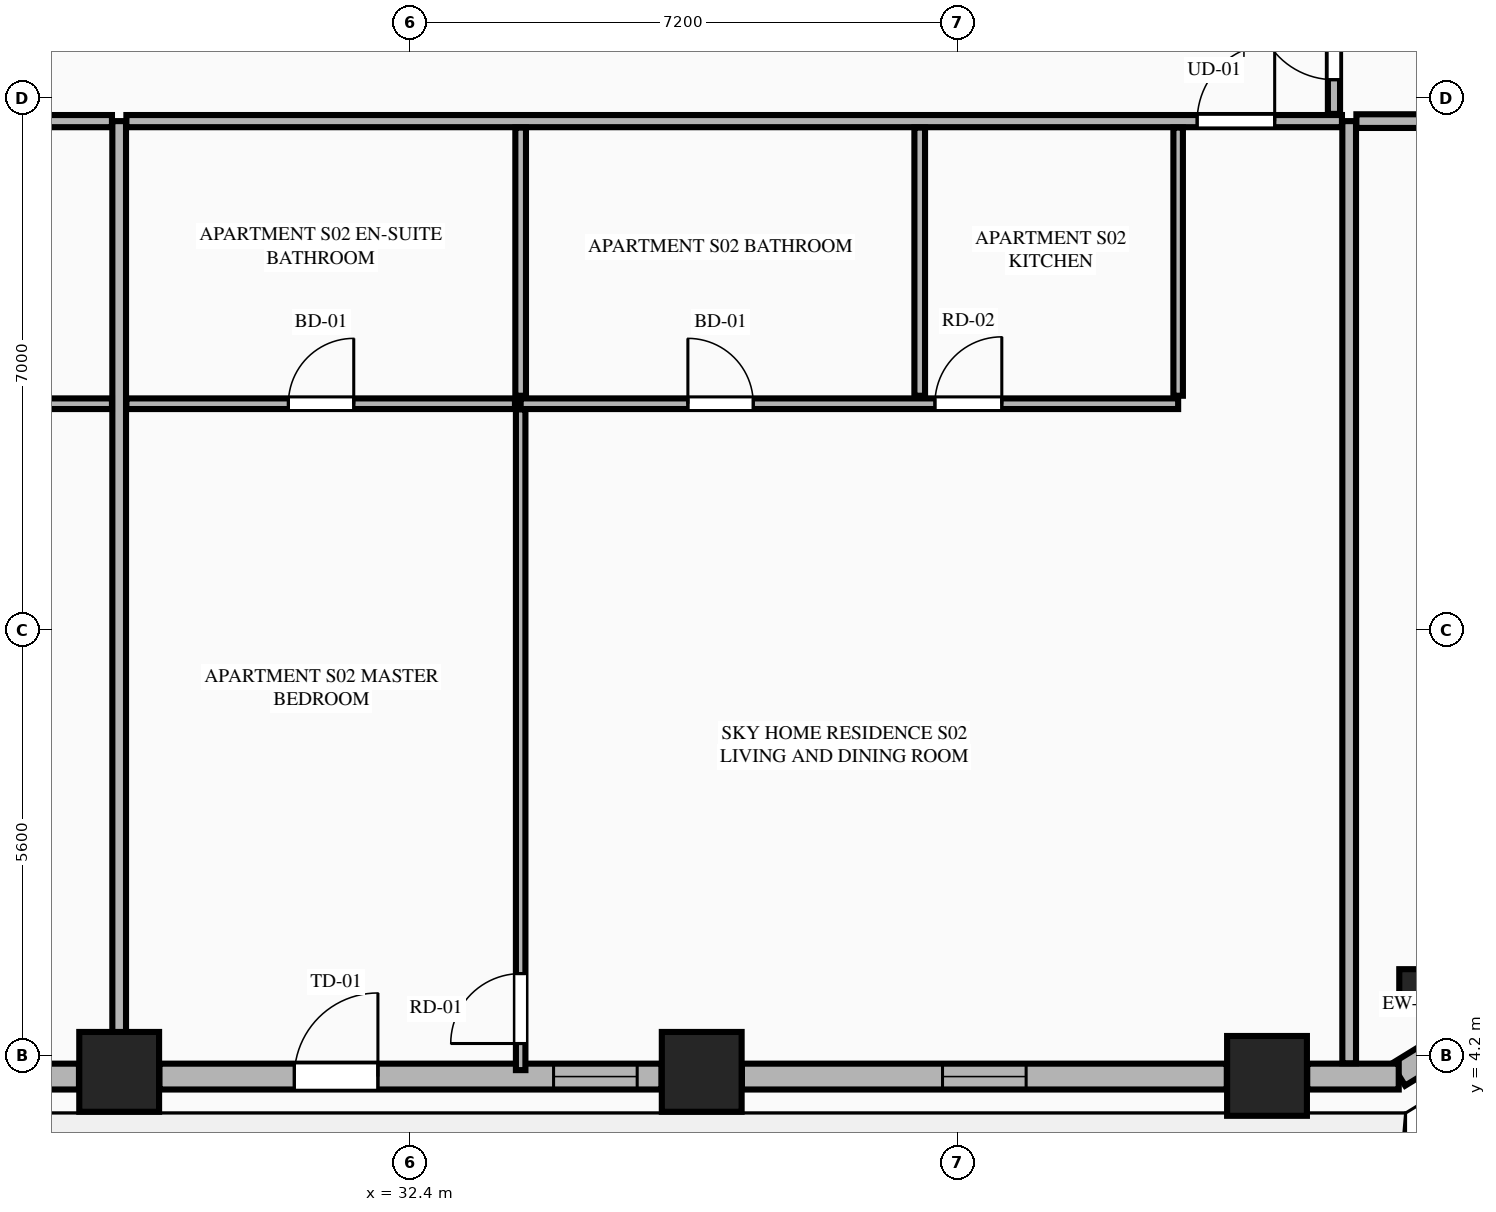
"""IFC4 building model, lengths in metres.
Left out: names, types, materials, properties, quantities, classifications, styles, units other than length and angle.
Written with IfcOpenShell. Run it as: python <this file> out.ifc"""

import sys

from ifc_helpers import new_model, si_unit, direction, frame, frame_2d, origin, origin_2d, place, context, subcontext, project, spatial, rectangle, extrude, element, fill, save


model = new_model("IFC4")
c1 = context("Model", 3, precision=1e-05, world=origin(), true_north=direction((0.0, 1.0)))
c2 = subcontext(c1, "Body", "Model", "MODEL_VIEW")
j1 = project(units=[si_unit("LENGTHUNIT", "METRE"), si_unit("PLANEANGLEUNIT", "RADIAN")], contexts=[c1])
p1 = place(None, origin())
s1 = spatial("IfcSite", under=j1, at=p1, CompositionType="ELEMENT")
p2 = place(p1, origin())
s2 = spatial("IfcBuilding", under=s1, at=p2, CompositionType="ELEMENT")
p3 = place(p2, frame((0.0, 0.0, 133.9)))
s3 = spatial("IfcBuildingStorey", under=s2, at=p3, CompositionType="ELEMENT", Elevation=133.9)
for number, where, z_axis, x_axis in (
    (1, (28.568, 3.992, 0.0), (0.0, 0.0, 1.0), (1.0, 0.0, 0.0)),
    (2, (36.232, 3.992, 0.0), (0.0, 0.0, 1.0), (1.0, 0.0, 0.0)),
    (3, (43.669, 3.939, 0.0), (0.0, 0.0, 1.0), (1.0, 0.0, 0.0)),
):
    element("IfcColumn", number, at=place(p3, frame(where, z_axis=z_axis, x_axis=x_axis)), inside=s3, PredefinedType="COLUMN", context=c2, shape_type="SweptSolid", body=[
        extrude(rectangle(XDim=1.05, YDim=1.05, at=origin_2d()), origin(), (0.0, 0.0, 1.0), 3.55),
    ])
p4 = place(p3, frame((45.659, 5.093, 0.0), z_axis=(0.0, 0.0, 1.0), x_axis=(0.865160173452, 0.501495637342, 0.0)))
e4 = element("IfcColumn", 4, at=p4, inside=s3, PredefinedType="PILASTER", context=c2, shape_type="SweptSolid", body=[
    extrude(rectangle(XDim=0.5, YDim=0.35, at=origin_2d()), origin(), (0.0, 0.0, 1.0), 3.55),
])
p5 = place(p3, frame((45.397, 3.955, 0.0), z_axis=(0.0, 0.0, 1.0), x_axis=(0.851798915137, 0.523868884523, 0.0)))
e5 = element("IfcWall", 5, at=p5, inside=s3, PredefinedType="STANDARD", context=c2, shape_type="SweptSolid", body=[
    extrude(rectangle(XDim=1.848, YDim=0.34, at=frame_2d((0.924, 0.0))), origin(), (0.0, 0.0, 1.0), 3.34),
])
p6 = place(p3, frame((21.66, 3.93, 0.0), z_axis=(0.0, 0.0, 1.0), x_axis=(1.0, 0.0, 0.0)))
e6 = element("IfcWall", 6, at=p6, inside=s3, PredefinedType="STANDARD", context=c2, shape_type="SweptSolid", body=[
    extrude(rectangle(XDim=6.379, YDim=0.34, at=frame_2d((3.189, 0.0))), origin(), (0.0, 0.0, 1.0), 2.797),
])
p7 = place(p6, frame((2.64, 0.0, 0.75)))
e7 = element("IfcOpeningElement", 7, at=p7, cuts=e6, PredefinedType="OPENING", context=c2, shape_type="SweptSolid", body=[
    extrude(rectangle(XDim=1.1, YDim=1.897, at=frame_2d((0.55, 0.948))), frame((0.0, 0.18, 0.0), z_axis=(0.0, -1.0, 0.0), x_axis=(1.0, 0.0, 0.0)), (0.0, 0.0, 1.0), 0.36),
])
p8 = place(p3, frame((29.097, 3.93, 0.0), z_axis=(0.0, 0.0, 1.0), x_axis=(1.0, 0.0, 0.0)))
e8 = element("IfcWall", 8, at=p8, inside=s3, PredefinedType="STANDARD", context=c2, shape_type="SweptSolid", body=[
    extrude(rectangle(XDim=6.606, YDim=0.34, at=frame_2d((3.303, 0.0))), origin(), (0.0, 0.0, 1.0), 2.797),
])
p9 = place(p8, frame((1.775, 0.0, 0.0)))
e9 = element("IfcOpeningElement", 9, at=p9, cuts=e8, PredefinedType="OPENING", context=c2, shape_type="SweptSolid", body=[
    extrude(rectangle(XDim=1.1, YDim=2.25, at=frame_2d((0.55, 1.125))), frame((0.0, 0.18, 0.0), z_axis=(0.0, -1.0, 0.0), x_axis=(1.0, 0.0, 0.0)), (0.0, 0.0, 1.0), 0.36),
])
p10 = place(p8, frame((5.186, 0.0, 0.75)))
e10 = element("IfcOpeningElement", 10, at=p10, cuts=e8, PredefinedType="OPENING", context=c2, shape_type="SweptSolid", body=[
    extrude(rectangle(XDim=1.1, YDim=1.897, at=frame_2d((0.55, 0.948))), frame((0.0, 0.18, 0.0), z_axis=(0.0, -1.0, 0.0), x_axis=(1.0, 0.0, 0.0)), (0.0, 0.0, 1.0), 0.36),
])
p11 = place(p3, frame((36.761, 3.93, 0.0), z_axis=(0.0, 0.0, 1.0), x_axis=(1.0, 0.0, 0.0)))
e11 = element("IfcWall", 11, at=p11, inside=s3, PredefinedType="STANDARD", context=c2, shape_type="SweptSolid", body=[
    extrude(rectangle(XDim=6.379, YDim=0.34, at=frame_2d((3.189, 0.0))), origin(), (0.0, 0.0, 1.0), 2.797),
])
p12 = place(p11, frame((2.639, 0.0, 0.75)))
e12 = element("IfcOpeningElement", 12, at=p12, cuts=e11, PredefinedType="OPENING", context=c2, shape_type="SweptSolid", body=[
    extrude(rectangle(XDim=1.1, YDim=1.897, at=frame_2d((0.55, 0.948))), frame((0.0, 0.18, 0.0), z_axis=(0.0, -1.0, 0.0), x_axis=(1.0, 0.0, 0.0)), (0.0, 0.0, 1.0), 0.36),
])
p13 = place(p3, frame((44.198, 3.93, 0.0), z_axis=(0.0, 0.0, 1.0), x_axis=(1.0, 0.0, 0.0)))
e13 = element("IfcWall", 13, at=p13, inside=s3, PredefinedType="STANDARD", context=c2, shape_type="SweptSolid", body=[
    extrude(rectangle(XDim=1.204, YDim=0.34, at=frame_2d((0.602, 0.0))), origin(), (0.0, 0.0, 1.0), 3.34),
])
p14 = place(p3, frame((28.568, 4.105, 0.0), z_axis=(0.0, 0.0, 1.0), x_axis=(0.0, 1.0, 0.0)))
e14 = element("IfcWall", 14, at=p14, inside=s3, PredefinedType="PARTITIONING", context=c2, shape_type="SweptSolid", body=[
    extrude(rectangle(XDim=12.395, YDim=0.18, at=frame_2d((6.198, 0.0))), origin(), (0.0, 0.0, 1.0), 2.722),
])
p15 = place(p3, frame((44.75, 4.105, 0.0), z_axis=(0.0, 0.0, 1.0), x_axis=(0.0, 1.0, 0.0)))
e15 = element("IfcWall", 15, at=p15, inside=s3, PredefinedType="PARTITIONING", context=c2, shape_type="SweptSolid", body=[
    extrude(rectangle(XDim=12.395, YDim=0.18, at=frame_2d((6.198, 0.0))), origin(), (0.0, 0.0, 1.0), 3.34),
])
p16 = place(p3, frame((20.145, 16.5, 0.0), z_axis=(0.0, 0.0, 1.0), x_axis=(1.0, 0.0, 0.0)))
e16 = element("IfcWall", 16, at=p16, inside=s3, PredefinedType="PARTITIONING", context=c2, shape_type="SweptSolid", body=[
    extrude(rectangle(XDim=8.328, YDim=0.16, at=frame_2d((4.164, 0.0))), origin(), (0.0, 0.0, 1.0), 3.34),
])
p17 = place(p16, frame((0.405, 0.0, 0.0)))
e17 = element("IfcOpeningElement", 17, at=p17, cuts=e16, PredefinedType="OPENING", context=c2, shape_type="SweptSolid", body=[
    extrude(rectangle(XDim=1.02, YDim=2.25, at=frame_2d((0.51, 1.125))), frame((0.0, 0.09, 0.0), z_axis=(0.0, -1.0, 0.0), x_axis=(1.0, 0.0, 0.0)), (0.0, 0.0, 1.0), 0.18),
])
p18 = place(p3, frame((22.1, 12.782, 0.0), z_axis=(0.0, 0.0, 1.0), x_axis=(1.0, 0.0, 0.0)))
e18 = element("IfcWall", 18, at=p18, inside=s3, PredefinedType="PLUMBINGWALL", context=c2, shape_type="SweptSolid", body=[
    extrude(rectangle(XDim=6.373, YDim=0.14, at=frame_2d((3.187, 0.0))), origin(), (0.0, 0.0, 1.0), 3.34),
])
p19 = place(p18, frame((4.314, 0.0, 0.0)))
e19 = element("IfcOpeningElement", 19, at=p19, cuts=e18, PredefinedType="OPENING", context=c2, shape_type="SweptSolid", body=[
    extrude(rectangle(XDim=0.86, YDim=2.1, at=frame_2d((0.43, 1.05))), frame((0.0, 0.08, 0.0), z_axis=(0.0, -1.0, 0.0), x_axis=(1.0, 0.0, 0.0)), (0.0, 0.0, 1.0), 0.16),
])
p20 = place(p18, frame((0.22, 0.0, 0.0)))
e20 = element("IfcOpeningElement", 20, at=p20, cuts=e18, PredefinedType="OPENING", context=c2, shape_type="SweptSolid", body=[
    extrude(rectangle(XDim=0.88, YDim=2.15, at=frame_2d((0.44, 1.075))), frame((0.0, 0.08, 0.0), z_axis=(0.0, -1.0, 0.0), x_axis=(1.0, 0.0, 0.0)), (0.0, 0.0, 1.0), 0.16),
])
p21 = place(p3, frame((28.663, 16.5, 0.0), z_axis=(0.0, 0.0, 1.0), x_axis=(1.0, 0.0, 0.0)))
e21 = element("IfcWall", 21, at=p21, inside=s3, PredefinedType="PARTITIONING", context=c2, shape_type="SweptSolid", body=[
    extrude(rectangle(XDim=15.992, YDim=0.16, at=frame_2d((7.996, 0.0))), origin(), (0.0, 0.0, 1.0), 3.34),
])
p22 = place(p21, frame((14.087, 0.0, 0.0)))
e22 = element("IfcOpeningElement", 22, at=p22, cuts=e21, PredefinedType="OPENING", context=c2, shape_type="SweptSolid", body=[
    extrude(rectangle(XDim=1.02, YDim=2.25, at=frame_2d((0.51, 1.125))), frame((0.0, 0.09, 0.0), z_axis=(0.0, -1.0, 0.0), x_axis=(1.0, 0.0, 0.0)), (0.0, 0.0, 1.0), 0.18),
])
p23 = place(p3, frame((42.5, 12.887, 0.0), z_axis=(0.0, 0.0, 1.0), x_axis=(0.0, 1.0, 0.0)))
e23 = element("IfcWall", 23, at=p23, inside=s3, PredefinedType="PARTITIONING", context=c2, shape_type="SweptSolid", body=[
    extrude(rectangle(XDim=3.528, YDim=0.125, at=frame_2d((1.764, 0.0))), origin(), (0.0, 0.0, 1.0), 2.722),
])
p24 = place(p3, frame((33.85, 12.782, 0.0), z_axis=(0.0, 0.0, 1.0), x_axis=(1.0, 0.0, 0.0)))
e24 = element("IfcWall", 24, at=p24, inside=s3, PredefinedType="PLUMBINGWALL", context=c2, shape_type="SweptSolid", body=[
    extrude(rectangle(XDim=8.65, YDim=0.14, at=frame_2d((4.325, 0.0))), origin(), (0.0, 0.0, 1.0), 3.34),
])
p25 = place(p24, frame((2.2, 0.0, 0.0)))
e25 = element("IfcOpeningElement", 25, at=p25, cuts=e24, PredefinedType="OPENING", context=c2, shape_type="SweptSolid", body=[
    extrude(rectangle(XDim=0.86, YDim=2.1, at=frame_2d((0.43, 1.05))), frame((0.0, 0.08, 0.0), z_axis=(0.0, -1.0, 0.0), x_axis=(1.0, 0.0, 0.0)), (0.0, 0.0, 1.0), 0.16),
])
p26 = place(p24, frame((5.45, 0.0, 0.0)))
e26 = element("IfcOpeningElement", 26, at=p26, cuts=e24, PredefinedType="OPENING", context=c2, shape_type="SweptSolid", body=[
    extrude(rectangle(XDim=0.88, YDim=2.15, at=frame_2d((0.44, 1.075))), frame((0.0, 0.08, 0.0), z_axis=(0.0, -1.0, 0.0), x_axis=(1.0, 0.0, 0.0)), (0.0, 0.0, 1.0), 0.16),
])
p27 = place(p3, frame((28.663, 12.782, 0.0), z_axis=(0.0, 0.0, 1.0), x_axis=(1.0, 0.0, 0.0)))
e27 = element("IfcWall", 27, at=p27, inside=s3, PredefinedType="PLUMBINGWALL", context=c2, shape_type="SweptSolid", body=[
    extrude(rectangle(XDim=5.112, YDim=0.14, at=frame_2d((2.556, 0.0))), origin(), (0.0, 0.0, 1.0), 3.34),
])
p28 = place(p27, frame((2.131, 0.0, 0.0)))
e28 = element("IfcOpeningElement", 28, at=p28, cuts=e27, PredefinedType="OPENING", context=c2, shape_type="SweptSolid", body=[
    extrude(rectangle(XDim=0.86, YDim=2.1, at=frame_2d((0.43, 1.05))), frame((0.0, 0.08, 0.0), z_axis=(0.0, -1.0, 0.0), x_axis=(1.0, 0.0, 0.0)), (0.0, 0.0, 1.0), 0.16),
])
for number, where, z_axis, x_axis in (
    (29, (39.1, 12.887, 0.0), (0.0, 0.0, 1.0), (0.0, 1.0, 0.0)),
    (30, (33.85, 12.887, 0.0), (0.0, 0.0, 1.0), (0.0, 1.0, 0.0)),
):
    element("IfcWall", number, at=place(p3, frame(where, z_axis=z_axis, x_axis=x_axis)), inside=s3, PredefinedType="PLUMBINGWALL", context=c2, shape_type="SweptSolid", body=[
        extrude(rectangle(XDim=3.528, YDim=0.14, at=frame_2d((1.764, 0.0))), origin(), (0.0, 0.0, 1.0), 3.34),
    ])
p29 = place(p3, frame((33.85, 4.015, 0.0), z_axis=(0.0, 0.0, 1.0), x_axis=(0.0, 1.0, 0.0)))
e31 = element("IfcWall", 31, at=p29, inside=s3, PredefinedType="PARTITIONING", context=c2, shape_type="SweptSolid", body=[
    extrude(rectangle(XDim=8.692, YDim=0.125, at=frame_2d((4.346, 0.0))), origin(), (0.0, 0.0, 1.0), 3.34),
])
p30 = place(p29, frame((0.35, 0.0, 0.0)))
e32 = element("IfcOpeningElement", 32, at=p30, cuts=e31, PredefinedType="OPENING", context=c2, shape_type="SweptSolid", body=[
    extrude(rectangle(XDim=0.92, YDim=2.15, at=frame_2d((0.46, 1.075))), frame((0.0, 0.073, 0.0), z_axis=(0.0, -1.0, 0.0), x_axis=(1.0, 0.0, 0.0)), (0.0, 0.0, 1.0), 0.145),
])
p31 = place(p3, frame((44.845, 16.5, 0.0), z_axis=(0.0, 0.0, 1.0), x_axis=(1.0, 0.0, 0.0)))
e33 = element("IfcWall", 33, at=p31, inside=s3, PredefinedType="PARTITIONING", context=c2, shape_type="SweptSolid", body=[
    extrude(rectangle(XDim=7.77, YDim=0.18, at=frame_2d((3.885, 0.0))), origin(), (0.0, 0.0, 1.0), 3.34),
])
p32 = place(p3, frame((44.55, 16.595, 0.0), z_axis=(0.0, 0.0, 1.0), x_axis=(0.0, 1.0, 0.0)))
e34 = element("IfcWall", 34, at=p32, inside=s3, PredefinedType="PARTITIONING", context=c2, shape_type="SweptSolid", body=[
    extrude(rectangle(XDim=9.21, YDim=0.16, at=frame_2d((4.605, 0.0))), origin(), (0.0, 0.0, 1.0), 3.34),
])
p33 = place(p32, frame((0.45, 0.0, 0.0)))
e35 = element("IfcOpeningElement", 35, at=p33, cuts=e34, PredefinedType="OPENING", context=c2, shape_type="SweptSolid", body=[
    extrude(rectangle(XDim=1.02, YDim=2.25, at=frame_2d((0.51, 1.125))), frame((0.0, 0.09, 0.0), z_axis=(0.0, -1.0, 0.0), x_axis=(1.0, 0.0, 0.0)), (0.0, 0.0, 1.0), 0.18),
])
p34 = place(p9, origin())
e36 = element("IfcDoor", 36, at=p34, inside=s3, OperationType="SINGLE_SWING_RIGHT", PredefinedType="DOOR", context=c2, shape_type="SweptSolid", body=[
    extrude(rectangle(XDim=1.1, YDim=2.25, at=frame_2d((0.55, 1.125))), frame((0.0, 0.025, 0.0), z_axis=(0.0, -1.0, 0.0), x_axis=(1.0, 0.0, 0.0)), (0.0, 0.0, 1.0), 0.05),
])
fill(e9, e36)
p35 = place(p12, origin())
e37 = element("IfcWindow", 37, at=p35, inside=s3, PartitioningType="SINGLE_PANEL", PredefinedType="WINDOW", context=c2, shape_type="SweptSolid", body=[
    extrude(rectangle(XDim=1.1, YDim=1.897, at=frame_2d((0.55, 0.948))), frame((0.0, 0.03, 0.0), z_axis=(0.0, -1.0, 0.0), x_axis=(1.0, 0.0, 0.0)), (0.0, 0.0, 1.0), 0.06),
])
fill(e12, e37)
p36 = place(p25, origin())
e38 = element("IfcDoor", 38, at=p36, inside=s3, OperationType="SINGLE_SWING_LEFT", PredefinedType="DOOR", context=c2, shape_type="SweptSolid", body=[
    extrude(rectangle(XDim=0.86, YDim=2.1, at=frame_2d((0.43, 1.05))), frame((0.0, 0.025, 0.0), z_axis=(0.0, -1.0, 0.0), x_axis=(1.0, 0.0, 0.0)), (0.0, 0.0, 1.0), 0.05),
])
fill(e25, e38)
p37 = place(p28, origin())
e39 = element("IfcDoor", 39, at=p37, inside=s3, OperationType="SINGLE_SWING_RIGHT", PredefinedType="DOOR", context=c2, shape_type="SweptSolid", body=[
    extrude(rectangle(XDim=0.86, YDim=2.1, at=frame_2d((0.43, 1.05))), frame((0.0, 0.025, 0.0), z_axis=(0.0, -1.0, 0.0), x_axis=(1.0, 0.0, 0.0)), (0.0, 0.0, 1.0), 0.05),
])
fill(e28, e39)
p38 = place(p22, origin())
e40 = element("IfcDoor", 40, at=p38, inside=s3, OperationType="SINGLE_SWING_RIGHT", PredefinedType="DOOR", context=c2, shape_type="SweptSolid", body=[
    extrude(rectangle(XDim=1.02, YDim=2.25, at=frame_2d((0.51, 1.125))), frame((0.0, 0.025, 0.0), z_axis=(0.0, -1.0, 0.0), x_axis=(1.0, 0.0, 0.0)), (0.0, 0.0, 1.0), 0.05),
])
fill(e22, e40)
p39 = place(p26, origin())
e41 = element("IfcDoor", 41, at=p39, inside=s3, OperationType="SINGLE_SWING_RIGHT", PredefinedType="DOOR", context=c2, shape_type="SweptSolid", body=[
    extrude(rectangle(XDim=0.88, YDim=2.15, at=frame_2d((0.44, 1.075))), frame((0.0, 0.025, 0.0), z_axis=(0.0, -1.0, 0.0), x_axis=(1.0, 0.0, 0.0)), (0.0, 0.0, 1.0), 0.05),
])
fill(e26, e41)
p40 = place(p30, origin())
e42 = element("IfcDoor", 42, at=p40, inside=s3, OperationType="SINGLE_SWING_LEFT", PredefinedType="DOOR", context=c2, shape_type="SweptSolid", body=[
    extrude(rectangle(XDim=0.92, YDim=2.15, at=frame_2d((0.46, 1.075))), frame((0.0, 0.025, 0.0), z_axis=(0.0, -1.0, 0.0), x_axis=(1.0, 0.0, 0.0)), (0.0, 0.0, 1.0), 0.05),
])
fill(e32, e42)
p41 = place(p33, origin())
e43 = element("IfcDoor", 43, at=p41, inside=s3, OperationType="SINGLE_SWING_RIGHT", PredefinedType="DOOR", context=c2, shape_type="SweptSolid", body=[
    extrude(rectangle(XDim=1.02, YDim=2.25, at=frame_2d((0.51, 1.125))), frame((0.0, 0.025, 0.0), z_axis=(0.0, -1.0, 0.0), x_axis=(1.0, 0.0, 0.0)), (0.0, 0.0, 1.0), 0.05),
])
fill(e35, e43)
p42 = place(p10, origin())
e44 = element("IfcWindow", 44, at=p42, inside=s3, PartitioningType="SINGLE_PANEL", PredefinedType="WINDOW", context=c2, shape_type="SweptSolid", body=[
    extrude(rectangle(XDim=1.1, YDim=1.897, at=frame_2d((0.55, 0.948))), frame((0.0, 0.03, 0.0), z_axis=(0.0, -1.0, 0.0), x_axis=(1.0, 0.0, 0.0)), (0.0, 0.0, 1.0), 0.06),
])
fill(e10, e44)
save(model, sys.argv[1])
